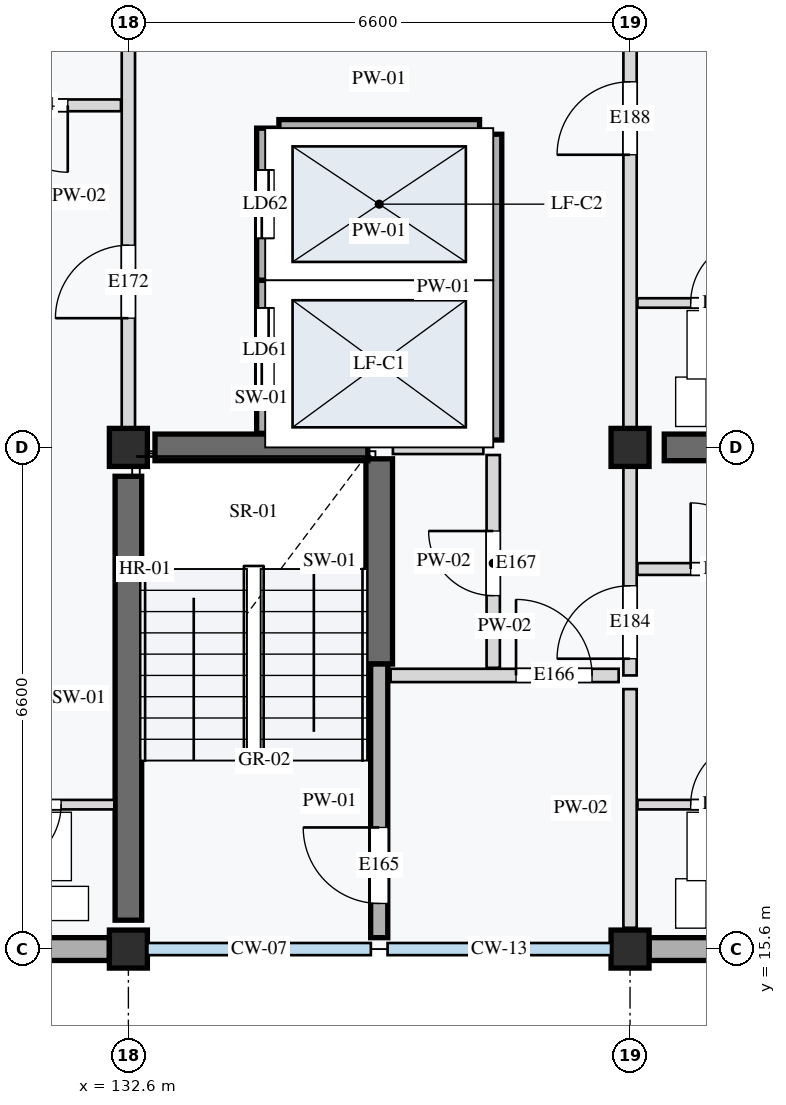
"""IFC4 building model, lengths in metres.
Left out: names, types, materials, properties, quantities, classifications, styles, units other than length and angle.
Written with IfcOpenShell. Run it as: python <this file> out.ifc"""

import sys

from ifc_helpers import new_model, si_unit, direction, frame, frame_2d, origin, origin_2d, place, context, subcontext, project, spatial, rectangle, extrude, element, fill, save


model = new_model("IFC4")
c1 = context("Model", 3, precision=1e-05, world=origin(), true_north=direction((0.0, 1.0)))
c2 = subcontext(c1, "Body", "Model", "MODEL_VIEW")
j1 = project(units=[si_unit("LENGTHUNIT", "METRE"), si_unit("PLANEANGLEUNIT", "RADIAN")], contexts=[c1])
p1 = place(None, origin())
s1 = spatial("IfcSite", under=j1, at=p1, CompositionType="ELEMENT")
p2 = place(p1, origin())
s2 = spatial("IfcBuilding", under=s1, at=p2, CompositionType="ELEMENT")
p3 = place(p2, frame((0.0, 0.0, 11.6)))
s3 = spatial("IfcBuildingStorey", under=s2, at=p3, CompositionType="ELEMENT", Elevation=11.6)
for number, where, z_axis, x_axis in (
    (1, (132.6, 15.6, 0.0), (0.0, 0.0, 1.0), (1.0, 0.0, 0.0)),
    (2, (139.2, 15.6, 0.0), (0.0, 0.0, 1.0), (1.0, 0.0, 0.0)),
    (3, (132.6, 22.2, 0.0), (0.0, 0.0, 1.0), (1.0, 0.0, 0.0)),
    (4, (139.2, 22.2, 0.0), (0.0, 0.0, 1.0), (1.0, 0.0, 0.0)),
):
    element("IfcColumn", number, at=place(p3, frame(where, z_axis=z_axis, x_axis=x_axis)), inside=s3, PredefinedType="COLUMN", context=c2, shape_type="SweptSolid", body=[
        extrude(rectangle(XDim=0.5, YDim=0.5, at=origin_2d()), origin(), (0.0, 0.0, 1.0), 3.2),
    ])
p4 = place(p3, frame((132.6, 15.98, 0.0), z_axis=(0.0, 0.0, 1.0), x_axis=(0.0, 1.0, 0.0)))
e5 = element("IfcWall", 5, at=p4, inside=s3, PredefinedType="SHEAR", context=c2, shape_type="SweptSolid", body=[
    extrude(rectangle(XDim=5.84, YDim=0.35, at=frame_2d((2.92, 0.0))), origin(), (0.0, 0.0, 1.0), 2.96),
])
p5 = place(p3, frame((135.9, 19.35, 0.0), z_axis=(0.0, 0.0, 1.0), x_axis=(0.0, 1.0, 0.0)))
e6 = element("IfcWall", 6, at=p5, inside=s3, PredefinedType="SHEAR", context=c2, shape_type="SweptSolid", body=[
    extrude(rectangle(XDim=2.7, YDim=0.35, at=frame_2d((1.35, 0.0))), origin(), (0.0, 0.0, 1.0), 2.96),
])
p6 = place(p3, frame((132.95, 22.2, 0.0), z_axis=(0.0, 0.0, 1.0), x_axis=(1.0, 0.0, 0.0)))
e7 = element("IfcWall", 7, at=p6, inside=s3, PredefinedType="SHEAR", context=c2, shape_type="SweptSolid", body=[
    extrude(rectangle(XDim=2.8, YDim=0.35, at=frame_2d((1.4, 0.0))), origin(), (0.0, 0.0, 1.0), 2.96),
])
p7 = place(p3, frame((139.65, 22.2, 0.0), z_axis=(0.0, 0.0, 1.0), x_axis=(1.0, 0.0, 0.0)))
e8 = element("IfcWall", 8, at=p7, inside=s3, PredefinedType="SHEAR", context=c2, shape_type="SweptSolid", body=[
    extrude(rectangle(XDim=5.7, YDim=0.35, at=frame_2d((2.85, 0.0))), origin(), (0.0, 0.0, 1.0), 2.96),
])
for number, where, z_axis, x_axis in (
    (9, (126.25, 15.6, 0.0), (0.0, 0.0, 1.0), (1.0, 0.0, 0.0)),
    (10, (139.45, 15.6, 0.0), (0.0, 0.0, 1.0), (1.0, 0.0, 0.0)),
):
    element("IfcWall", number, at=place(p3, frame(where, z_axis=z_axis, x_axis=x_axis)), inside=s3, PredefinedType="STANDARD", context=c2, shape_type="SweptSolid", body=[
        extrude(rectangle(XDim=6.1, YDim=0.3, at=frame_2d((3.05, 0.0))), origin(), (0.0, 0.0, 1.0), 2.65),
    ])
p8 = place(p3, frame((135.9, 15.75, 0.0), z_axis=(0.0, 0.0, 1.0), x_axis=(0.0, 1.0, 0.0)))
e11 = element("IfcWall", 11, at=p8, inside=s3, PredefinedType="STANDARD", context=c2, shape_type="SweptSolid", body=[
    extrude(rectangle(XDim=3.6, YDim=0.225, at=frame_2d((1.8, 0.0))), origin(), (0.0, 0.0, 1.0), 2.96),
])
p9 = place(p8, frame((0.45, 0.0, 0.0)))
e12 = element("IfcOpeningElement", 12, at=p9, cuts=e11, PredefinedType="OPENING", context=c2, shape_type="SweptSolid", body=[
    extrude(rectangle(XDim=1.0, YDim=2.1, at=frame_2d((0.5, 1.05))), frame((0.0, 0.123, 0.0), z_axis=(0.0, -1.0, 0.0), x_axis=(1.0, 0.0, 0.0)), (0.0, 0.0, 1.0), 0.245),
])
p10 = place(p3, frame((136.05, 19.2, 0.0), z_axis=(0.0, 0.0, 1.0), x_axis=(1.0, 0.0, 0.0)))
e13 = element("IfcWall", 13, at=p10, inside=s3, PredefinedType="PARTITIONING", context=c2, shape_type="SweptSolid", body=[
    extrude(rectangle(XDim=3.0, YDim=0.175, at=frame_2d((1.5, 0.0))), origin(), (0.0, 0.0, 1.0), 2.96),
])
p11 = place(p10, frame((1.65, 0.0, 0.0)))
e14 = element("IfcOpeningElement", 14, at=p11, cuts=e13, PredefinedType="OPENING", context=c2, shape_type="SweptSolid", body=[
    extrude(rectangle(XDim=1.0, YDim=2.16, at=frame_2d((0.5, 1.08))), frame((0.0, 0.097, 0.0), z_axis=(0.0, -1.0, 0.0), x_axis=(1.0, 0.0, 0.0)), (0.0, 0.0, 1.0), 0.195),
])
p12 = place(p3, frame((137.4, 19.3, 0.0), z_axis=(0.0, 0.0, 1.0), x_axis=(0.0, 1.0, 0.0)))
e15 = element("IfcWall", 15, at=p12, inside=s3, PredefinedType="PARTITIONING", context=c2, shape_type="SweptSolid", body=[
    extrude(rectangle(XDim=2.8, YDim=0.175, at=frame_2d((1.4, 0.0))), origin(), (0.0, 0.0, 1.0), 2.96),
])
p13 = place(p12, frame((0.95, 0.0, 0.0)))
e16 = element("IfcOpeningElement", 16, at=p13, cuts=e15, PredefinedType="OPENING", context=c2, shape_type="SweptSolid", body=[
    extrude(rectangle(XDim=0.85, YDim=2.0, at=frame_2d((0.425, 1.0))), frame((0.0, 0.097, 0.0), z_axis=(0.0, -1.0, 0.0), x_axis=(1.0, 0.0, 0.0)), (0.0, 0.0, 1.0), 0.195),
])
p14 = place(p3, frame((136.08, 22.2, 0.0), z_axis=(0.0, 0.0, 1.0), x_axis=(1.0, 0.0, 0.0)))
e17 = element("IfcWall", 17, at=p14, inside=s3, PredefinedType="PARTITIONING", context=c2, shape_type="SweptSolid", body=[
    extrude(rectangle(XDim=1.19, YDim=0.175, at=frame_2d((0.595, 0.0))), origin(), (0.0, 0.0, 1.0), 2.96),
])
p15 = place(p3, frame((134.4, 22.385, 0.0), z_axis=(0.0, 0.0, 1.0), x_axis=(0.0, 1.0, 0.0)))
e18 = element("IfcWall", 18, at=p15, inside=s3, PredefinedType="STANDARD", context=c2, shape_type="SweptSolid", body=[
    extrude(rectangle(XDim=2.015, YDim=0.225, at=frame_2d((1.007, 0.0))), origin(), (0.0, 0.0, 1.0), 2.96),
])
p16 = place(p15, frame((0.55, 0.0, 0.0)))
e19 = element("IfcOpeningElement", 19, at=p16, cuts=e18, PredefinedType="OPENING", context=c2, shape_type="SweptSolid", body=[
    extrude(rectangle(XDim=1.1, YDim=2.1, at=frame_2d((0.55, 1.05))), frame((0.0, 0.123, 0.0), z_axis=(0.0, -1.0, 0.0), x_axis=(1.0, 0.0, 0.0)), (0.0, 0.0, 1.0), 0.245),
])
p17 = place(p3, frame((134.4, 24.4, 0.0), z_axis=(0.0, 0.0, 1.0), x_axis=(0.0, 1.0, 0.0)))
e20 = element("IfcWall", 20, at=p17, inside=s3, PredefinedType="STANDARD", context=c2, shape_type="SweptSolid", body=[
    extrude(rectangle(XDim=2.0, YDim=0.225, at=frame_2d((1.0, 0.0))), origin(), (0.0, 0.0, 1.0), 2.96),
])
p18 = place(p17, frame((0.55, 0.0, 0.0)))
e21 = element("IfcOpeningElement", 21, at=p18, cuts=e20, PredefinedType="OPENING", context=c2, shape_type="SweptSolid", body=[
    extrude(rectangle(XDim=0.9, YDim=2.1, at=frame_2d((0.45, 1.05))), frame((0.0, 0.123, 0.0), z_axis=(0.0, -1.0, 0.0), x_axis=(1.0, 0.0, 0.0)), (0.0, 0.0, 1.0), 0.245),
])
p19 = place(p3, frame((137.4, 22.298, 0.0), z_axis=(0.0, 0.0, 1.0), x_axis=(0.0, 1.0, 0.0)))
e22 = element("IfcWall", 22, at=p19, inside=s3, PredefinedType="STANDARD", context=c2, shape_type="SweptSolid", body=[
    extrude(rectangle(XDim=4.022, YDim=0.225, at=frame_2d((2.011, 0.0))), origin(), (0.0, 0.0, 1.0), 2.96),
])
for number, where, z_axis, x_axis in (
    (23, (134.58, 24.4, 0.0), (0.0, 0.0, 1.0), (1.0, 0.0, 0.0)),
    (24, (134.58, 26.4, 0.0), (0.0, 0.0, 1.0), (1.0, 0.0, 0.0)),
):
    element("IfcWall", number, at=place(p3, frame(where, z_axis=z_axis, x_axis=x_axis)), inside=s3, PredefinedType="STANDARD", context=c2, shape_type="SweptSolid", body=[
        extrude(rectangle(XDim=2.64, YDim=0.225, at=frame_2d((1.32, 0.0))), origin(), (0.0, 0.0, 1.0), 2.96),
    ])
p20 = place(p3, frame((132.6, 22.2, 0.0), z_axis=(0.0, 0.0, 1.0), x_axis=(0.0, 1.0, 0.0)))
e25 = element("IfcWall", 25, at=p20, inside=s3, PredefinedType="PARTITIONING", context=c2, shape_type="SweptSolid", body=[
    extrude(rectangle(XDim=6.6, YDim=0.175, at=frame_2d((3.3, 0.0))), origin(), (0.0, 0.0, 1.0), 2.55),
])
p21 = place(p20, frame((1.7, 0.0, 0.0)))
e26 = element("IfcOpeningElement", 26, at=p21, cuts=e25, PredefinedType="OPENING", context=c2, shape_type="SweptSolid", body=[
    extrude(rectangle(XDim=0.96, YDim=2.18, at=frame_2d((0.48, 1.09))), frame((0.0, 0.097, 0.0), z_axis=(0.0, -1.0, 0.0), x_axis=(1.0, 0.0, 0.0)), (0.0, 0.0, 1.0), 0.195),
])
p22 = place(p3, frame((132.415, 17.5, 0.0), z_axis=(0.0, 0.0, 1.0), x_axis=(-1.0, 0.0, 0.0)))
e27 = element("IfcWall", 27, at=p22, inside=s3, PredefinedType="PARTITIONING", context=c2, shape_type="SweptSolid", body=[
    extrude(rectangle(XDim=2.215, YDim=0.125, at=frame_2d((1.107, 0.0))), origin(), (0.0, 0.0, 1.0), 2.96),
])
p23 = place(p22, frame((0.7, 0.0, 0.0)))
e28 = element("IfcOpeningElement", 28, at=p23, cuts=e27, PredefinedType="OPENING", context=c2, shape_type="SweptSolid", body=[
    extrude(rectangle(XDim=0.85, YDim=2.04, at=frame_2d((0.425, 1.02))), frame((0.0, 0.073, 0.0), z_axis=(0.0, -1.0, 0.0), x_axis=(1.0, 0.0, 0.0)), (0.0, 0.0, 1.0), 0.145),
])
p24 = place(p3, frame((132.502, 26.7, 0.0), z_axis=(0.0, 0.0, 1.0), x_axis=(-1.0, 0.0, 0.0)))
e29 = element("IfcWall", 29, at=p24, inside=s3, PredefinedType="PARTITIONING", context=c2, shape_type="SweptSolid", body=[
    extrude(rectangle(XDim=2.302, YDim=0.155, at=frame_2d((1.151, 0.0))), origin(), (0.0, 0.0, 1.0), 2.96),
])
p25 = place(p24, frame((0.7, 0.0, 0.0)))
e30 = element("IfcOpeningElement", 30, at=p25, cuts=e29, PredefinedType="OPENING", context=c2, shape_type="SweptSolid", body=[
    extrude(rectangle(XDim=0.88, YDim=2.16, at=frame_2d((0.44, 1.08))), frame((0.0, 0.087, 0.0), z_axis=(0.0, -1.0, 0.0), x_axis=(1.0, 0.0, 0.0)), (0.0, 0.0, 1.0), 0.175),
])
p26 = place(p3, frame((139.2, 15.88, 0.0), z_axis=(0.0, 0.0, 1.0), x_axis=(0.0, 1.0, 0.0)))
e31 = element("IfcWall", 31, at=p26, inside=s3, PredefinedType="PARTITIONING", context=c2, shape_type="SweptSolid", body=[
    extrude(rectangle(XDim=3.14, YDim=0.175, at=frame_2d((1.57, 0.0))), origin(), (0.0, 0.0, 1.0), 2.55),
])
p27 = place(p3, frame((139.2, 19.2, 0.0), z_axis=(0.0, 0.0, 1.0), x_axis=(0.0, 1.0, 0.0)))
e32 = element("IfcWall", 32, at=p27, inside=s3, PredefinedType="PARTITIONING", context=c2, shape_type="SweptSolid", body=[
    extrude(rectangle(XDim=3.0, YDim=0.175, at=frame_2d((1.5, 0.0))), origin(), (0.0, 0.0, 1.0), 2.55),
])
p28 = place(p27, frame((0.22, 0.0, 0.0)))
e33 = element("IfcOpeningElement", 33, at=p28, cuts=e32, PredefinedType="OPENING", context=c2, shape_type="SweptSolid", body=[
    extrude(rectangle(XDim=0.96, YDim=2.18, at=frame_2d((0.48, 1.09))), frame((0.0, 0.097, 0.0), z_axis=(0.0, -1.0, 0.0), x_axis=(1.0, 0.0, 0.0)), (0.0, 0.0, 1.0), 0.195),
])
p29 = place(p3, frame((139.298, 17.5, 0.0), z_axis=(0.0, 0.0, 1.0), x_axis=(1.0, 0.0, 0.0)))
e34 = element("IfcWall", 34, at=p29, inside=s3, PredefinedType="PARTITIONING", context=c2, shape_type="SweptSolid", body=[
    extrude(rectangle(XDim=2.302, YDim=0.125, at=frame_2d((1.151, 0.0))), origin(), (0.0, 0.0, 1.0), 2.96),
])
p30 = place(p29, frame((0.7, 0.0, 0.0)))
e35 = element("IfcOpeningElement", 35, at=p30, cuts=e34, PredefinedType="OPENING", context=c2, shape_type="SweptSolid", body=[
    extrude(rectangle(XDim=0.85, YDim=2.04, at=frame_2d((0.425, 1.02))), frame((0.0, 0.073, 0.0), z_axis=(0.0, -1.0, 0.0), x_axis=(1.0, 0.0, 0.0)), (0.0, 0.0, 1.0), 0.145),
])
p31 = place(p3, frame((139.298, 20.6, 0.0), z_axis=(0.0, 0.0, 1.0), x_axis=(1.0, 0.0, 0.0)))
e36 = element("IfcWall", 36, at=p31, inside=s3, PredefinedType="PARTITIONING", context=c2, shape_type="SweptSolid", body=[
    extrude(rectangle(XDim=2.302, YDim=0.155, at=frame_2d((1.151, 0.0))), origin(), (0.0, 0.0, 1.0), 2.96),
])
p32 = place(p31, frame((0.7, 0.0, 0.0)))
e37 = element("IfcOpeningElement", 37, at=p32, cuts=e36, PredefinedType="OPENING", context=c2, shape_type="SweptSolid", body=[
    extrude(rectangle(XDim=0.87, YDim=2.08, at=frame_2d((0.435, 1.04))), frame((0.0, 0.087, 0.0), z_axis=(0.0, -1.0, 0.0), x_axis=(1.0, 0.0, 0.0)), (0.0, 0.0, 1.0), 0.175),
])
p33 = place(p3, frame((139.2, 22.2, 0.0), z_axis=(0.0, 0.0, 1.0), x_axis=(0.0, 1.0, 0.0)))
e38 = element("IfcWall", 38, at=p33, inside=s3, PredefinedType="PARTITIONING", context=c2, shape_type="SweptSolid", body=[
    extrude(rectangle(XDim=6.6, YDim=0.175, at=frame_2d((3.3, 0.0))), origin(), (0.0, 0.0, 1.0), 2.55),
])
p34 = place(p33, frame((3.85, 0.0, 0.0)))
e39 = element("IfcOpeningElement", 39, at=p34, cuts=e38, PredefinedType="OPENING", context=c2, shape_type="SweptSolid", body=[
    extrude(rectangle(XDim=0.96, YDim=2.18, at=frame_2d((0.48, 1.09))), frame((0.0, 0.097, 0.0), z_axis=(0.0, -1.0, 0.0), x_axis=(1.0, 0.0, 0.0)), (0.0, 0.0, 1.0), 0.195),
])
p35 = place(p3, frame((139.298, 24.1, 0.0), z_axis=(0.0, 0.0, 1.0), x_axis=(1.0, 0.0, 0.0)))
e40 = element("IfcWall", 40, at=p35, inside=s3, PredefinedType="PARTITIONING", context=c2, shape_type="SweptSolid", body=[
    extrude(rectangle(XDim=2.302, YDim=0.125, at=frame_2d((1.151, 0.0))), origin(), (0.0, 0.0, 1.0), 2.96),
])
p36 = place(p35, frame((0.7, 0.0, 0.0)))
e41 = element("IfcOpeningElement", 41, at=p36, cuts=e40, PredefinedType="OPENING", context=c2, shape_type="SweptSolid", body=[
    extrude(rectangle(XDim=0.85, YDim=2.04, at=frame_2d((0.425, 1.02))), frame((0.0, 0.073, 0.0), z_axis=(0.0, -1.0, 0.0), x_axis=(1.0, 0.0, 0.0)), (0.0, 0.0, 1.0), 0.145),
])
p37 = place(p9, origin())
e42 = element("IfcDoor", 42, at=p37, inside=s3, OperationType="SINGLE_SWING_RIGHT", PredefinedType="DOOR", context=c2, shape_type="SweptSolid", body=[
    extrude(rectangle(XDim=1.0, YDim=2.1, at=frame_2d((0.5, 1.05))), frame((0.0, 0.025, 0.0), z_axis=(0.0, -1.0, 0.0), x_axis=(1.0, 0.0, 0.0)), (0.0, 0.0, 1.0), 0.05),
])
fill(e12, e42)
p38 = place(p11, origin())
e43 = element("IfcDoor", 43, at=p38, inside=s3, OperationType="SINGLE_SWING_LEFT", PredefinedType="DOOR", context=c2, shape_type="SweptSolid", body=[
    extrude(rectangle(XDim=1.0, YDim=2.16, at=frame_2d((0.5, 1.08))), frame((0.0, 0.025, 0.0), z_axis=(0.0, -1.0, 0.0), x_axis=(1.0, 0.0, 0.0)), (0.0, 0.0, 1.0), 0.05),
])
fill(e14, e43)
p39 = place(p13, origin())
e44 = element("IfcDoor", 44, at=p39, inside=s3, OperationType="SINGLE_SWING_RIGHT", PredefinedType="DOOR", context=c2, shape_type="SweptSolid", body=[
    extrude(rectangle(XDim=0.85, YDim=2.0, at=frame_2d((0.425, 1.0))), frame((0.0, 0.025, 0.0), z_axis=(0.0, -1.0, 0.0), x_axis=(1.0, 0.0, 0.0)), (0.0, 0.0, 1.0), 0.05),
])
fill(e16, e44)
p40 = place(p16, origin())
e45 = element("IfcDoor", 45, at=p40, inside=s3, OperationType="DOUBLE_DOOR_SLIDING", PredefinedType="DOOR", context=c2, shape_type="SweptSolid", body=[
    extrude(rectangle(XDim=1.1, YDim=2.1, at=frame_2d((0.55, 1.05))), frame((0.0, 0.025, 0.0), z_axis=(0.0, -1.0, 0.0), x_axis=(1.0, 0.0, 0.0)), (0.0, 0.0, 1.0), 0.05),
])
fill(e19, e45)
p41 = place(p18, origin())
e46 = element("IfcDoor", 46, at=p41, inside=s3, OperationType="DOUBLE_DOOR_SLIDING", PredefinedType="DOOR", context=c2, shape_type="SweptSolid", body=[
    extrude(rectangle(XDim=0.9, YDim=2.1, at=frame_2d((0.45, 1.05))), frame((0.0, 0.025, 0.0), z_axis=(0.0, -1.0, 0.0), x_axis=(1.0, 0.0, 0.0)), (0.0, 0.0, 1.0), 0.05),
])
fill(e21, e46)
p42 = place(p21, origin())
e47 = element("IfcDoor", 47, at=p42, inside=s3, OperationType="SINGLE_SWING_LEFT", PredefinedType="DOOR", context=c2, shape_type="SweptSolid", body=[
    extrude(rectangle(XDim=0.96, YDim=2.18, at=frame_2d((0.48, 1.09))), frame((0.0, 0.025, 0.0), z_axis=(0.0, -1.0, 0.0), x_axis=(1.0, 0.0, 0.0)), (0.0, 0.0, 1.0), 0.05),
])
fill(e26, e47)
p43 = place(p23, origin())
e48 = element("IfcDoor", 48, at=p43, inside=s3, OperationType="SINGLE_SWING_RIGHT", PredefinedType="DOOR", context=c2, shape_type="SweptSolid", body=[
    extrude(rectangle(XDim=0.85, YDim=2.04, at=frame_2d((0.425, 1.02))), frame((0.0, 0.025, 0.0), z_axis=(0.0, -1.0, 0.0), x_axis=(1.0, 0.0, 0.0)), (0.0, 0.0, 1.0), 0.05),
])
fill(e28, e48)
p44 = place(p25, origin())
e49 = element("IfcDoor", 49, at=p44, inside=s3, OperationType="SINGLE_SWING_LEFT", PredefinedType="DOOR", context=c2, shape_type="SweptSolid", body=[
    extrude(rectangle(XDim=0.88, YDim=2.16, at=frame_2d((0.44, 1.08))), frame((0.0, 0.025, 0.0), z_axis=(0.0, -1.0, 0.0), x_axis=(1.0, 0.0, 0.0)), (0.0, 0.0, 1.0), 0.05),
])
fill(e30, e49)
p45 = place(p28, origin())
e50 = element("IfcDoor", 50, at=p45, inside=s3, OperationType="SINGLE_SWING_LEFT", PredefinedType="DOOR", context=c2, shape_type="SweptSolid", body=[
    extrude(rectangle(XDim=0.96, YDim=2.18, at=frame_2d((0.48, 1.09))), frame((0.0, 0.025, 0.0), z_axis=(0.0, -1.0, 0.0), x_axis=(1.0, 0.0, 0.0)), (0.0, 0.0, 1.0), 0.05),
])
fill(e33, e50)
p46 = place(p30, origin())
e51 = element("IfcDoor", 51, at=p46, inside=s3, OperationType="SINGLE_SWING_RIGHT", PredefinedType="DOOR", context=c2, shape_type="SweptSolid", body=[
    extrude(rectangle(XDim=0.85, YDim=2.04, at=frame_2d((0.425, 1.02))), frame((0.0, 0.025, 0.0), z_axis=(0.0, -1.0, 0.0), x_axis=(1.0, 0.0, 0.0)), (0.0, 0.0, 1.0), 0.05),
])
fill(e35, e51)
p47 = place(p32, origin())
e52 = element("IfcDoor", 52, at=p47, inside=s3, OperationType="SINGLE_SWING_LEFT", PredefinedType="DOOR", context=c2, shape_type="SweptSolid", body=[
    extrude(rectangle(XDim=0.87, YDim=2.08, at=frame_2d((0.435, 1.04))), frame((0.0, 0.025, 0.0), z_axis=(0.0, -1.0, 0.0), x_axis=(1.0, 0.0, 0.0)), (0.0, 0.0, 1.0), 0.05),
])
fill(e37, e52)
p48 = place(p34, origin())
e53 = element("IfcDoor", 53, at=p48, inside=s3, OperationType="SINGLE_SWING_LEFT", PredefinedType="DOOR", context=c2, shape_type="SweptSolid", body=[
    extrude(rectangle(XDim=0.96, YDim=2.18, at=frame_2d((0.48, 1.09))), frame((0.0, 0.025, 0.0), z_axis=(0.0, -1.0, 0.0), x_axis=(1.0, 0.0, 0.0)), (0.0, 0.0, 1.0), 0.05),
])
fill(e39, e53)
p49 = place(p36, origin())
e54 = element("IfcDoor", 54, at=p49, inside=s3, OperationType="SINGLE_SWING_RIGHT", PredefinedType="DOOR", context=c2, shape_type="SweptSolid", body=[
    extrude(rectangle(XDim=0.85, YDim=2.04, at=frame_2d((0.425, 1.02))), frame((0.0, 0.025, 0.0), z_axis=(0.0, -1.0, 0.0), x_axis=(1.0, 0.0, 0.0)), (0.0, 0.0, 1.0), 0.05),
])
fill(e41, e54)
save(model, sys.argv[1])
